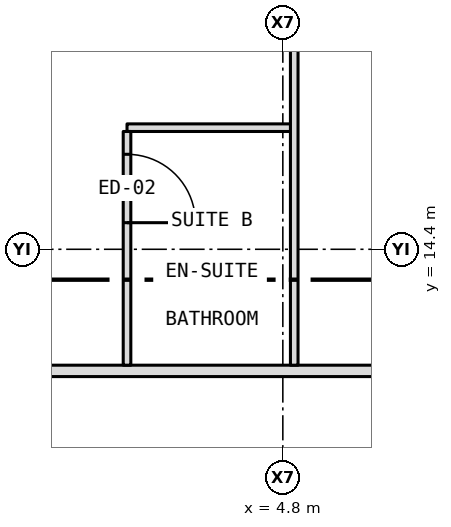
"""IFC4 building model, lengths in metres.
Left out: names, types, materials, properties, quantities, classifications, styles, units other than length and angle.
Written with IfcOpenShell. Run it as: python <this file> out.ifc"""

import sys

from ifc_helpers import new_model, si_unit, direction, frame, frame_2d, origin, place, context, subcontext, project, spatial, rectangle, extrude, element, fill, save


model = new_model("IFC4")
c1 = context("Model", 3, precision=1e-05, world=origin(), true_north=direction((0.0, 1.0)))
c2 = subcontext(c1, "Body", "Model", "MODEL_VIEW")
j1 = project(units=[si_unit("LENGTHUNIT", "METRE"), si_unit("PLANEANGLEUNIT", "RADIAN")], contexts=[c1])
p1 = place(None, origin())
s1 = spatial("IfcSite", under=j1, at=p1, CompositionType="ELEMENT")
p2 = place(p1, origin())
s2 = spatial("IfcBuilding", under=s1, at=p2, CompositionType="ELEMENT")
p3 = place(p2, frame((0.0, 0.0, 191.0)))
s3 = spatial("IfcBuildingStorey", under=s2, at=p3, CompositionType="ELEMENT", Elevation=191.0)
p4 = place(p3, frame((-15.8, 12.8, 0.0), z_axis=(0.0, 0.0, 1.0), x_axis=(1.0, 0.0, 0.0)))
e1 = element("IfcWall", 1, at=p4, inside=s3, PredefinedType="PARTITIONING", context=c2, shape_type="SweptSolid", body=[
    extrude(rectangle(XDim=31.6, YDim=0.15, at=frame_2d((15.8, 0.0))), origin(), (0.0, 0.0, 1.0), 3.35),
])
p5 = place(p4, frame((7.708, 0.0, 0.0)))
e2 = element("IfcOpeningElement", 2, at=p5, cuts=e1, PredefinedType="OPENING", context=c2, shape_type="SweptSolid", body=[
    extrude(rectangle(XDim=1.0, YDim=2.1, at=frame_2d((0.5, 1.05))), frame((0.0, 0.087, 0.0), z_axis=(0.0, -1.0, 0.0), x_axis=(1.0, 0.0, 0.0)), (0.0, 0.0, 1.0), 0.174),
])
p6 = place(p4, frame((12.568, 0.0, 0.0)))
e3 = element("IfcOpeningElement", 3, at=p6, cuts=e1, PredefinedType="OPENING", context=c2, shape_type="SweptSolid", body=[
    extrude(rectangle(XDim=1.0, YDim=2.1, at=frame_2d((0.5, 1.05))), frame((0.0, 0.087, 0.0), z_axis=(0.0, -1.0, 0.0), x_axis=(1.0, 0.0, 0.0)), (0.0, 0.0, 1.0), 0.174),
])
p7 = place(p4, frame((22.892, 0.0, 0.0)))
e4 = element("IfcOpeningElement", 4, at=p7, cuts=e1, PredefinedType="OPENING", context=c2, shape_type="SweptSolid", body=[
    extrude(rectangle(XDim=1.0, YDim=2.1, at=frame_2d((0.5, 1.05))), frame((0.0, 0.087, 0.0), z_axis=(0.0, -1.0, 0.0), x_axis=(1.0, 0.0, 0.0)), (0.0, 0.0, 1.0), 0.174),
])
p8 = place(p4, frame((1.192, 0.0, 0.0)))
e5 = element("IfcOpeningElement", 5, at=p8, cuts=e1, PredefinedType="OPENING", context=c2, shape_type="SweptSolid", body=[
    extrude(rectangle(XDim=1.0, YDim=2.1, at=frame_2d((0.5, 1.05))), frame((0.0, 0.087, 0.0), z_axis=(0.0, -1.0, 0.0), x_axis=(1.0, 0.0, 0.0)), (0.0, 0.0, 1.0), 0.174),
])
p9 = place(p4, frame((29.409, 0.0, 0.0)))
e6 = element("IfcOpeningElement", 6, at=p9, cuts=e1, PredefinedType="OPENING", context=c2, shape_type="SweptSolid", body=[
    extrude(rectangle(XDim=1.0, YDim=2.1, at=frame_2d((0.5, 1.05))), frame((0.0, 0.087, 0.0), z_axis=(0.0, -1.0, 0.0), x_axis=(1.0, 0.0, 0.0)), (0.0, 0.0, 1.0), 0.174),
])
p10 = place(p3, frame((2.75, 16.0, 0.0), z_axis=(0.0, 0.0, 1.0), x_axis=(1.0, 0.0, 0.0)))
e7 = element("IfcWall", 7, at=p10, inside=s3, PredefinedType="PARTITIONING", context=c2, shape_type="SweptSolid", body=[
    extrude(rectangle(XDim=2.2, YDim=0.1, at=frame_2d((1.1, 0.0))), origin(), (0.0, 0.0, 1.0), 3.35),
])
p11 = place(p3, frame((2.75, 12.875, 0.0), z_axis=(0.0, 0.0, 1.0), x_axis=(0.0, 1.0, 0.0)))
e8 = element("IfcWall", 8, at=p11, inside=s3, PredefinedType="PARTITIONING", context=c2, shape_type="SweptSolid", body=[
    extrude(rectangle(XDim=3.075, YDim=0.1, at=frame_2d((1.538, 0.0))), origin(), (0.0, 0.0, 1.0), 3.35),
])
p12 = place(p11, frame((1.875, 0.0, 0.0)))
e9 = element("IfcOpeningElement", 9, at=p12, cuts=e8, PredefinedType="OPENING", context=c2, shape_type="SweptSolid", body=[
    extrude(rectangle(XDim=0.9, YDim=2.1, at=frame_2d((0.45, 1.05))), frame((0.0, 0.062, 0.0), z_axis=(0.0, -1.0, 0.0), x_axis=(1.0, 0.0, 0.0)), (0.0, 0.0, 1.0), 0.124),
])
p13 = place(p3, frame((4.95, 12.875, 0.0), z_axis=(0.0, 0.0, 1.0), x_axis=(0.0, 1.0, 0.0)))
e10 = element("IfcWall", 10, at=p13, inside=s3, PredefinedType="PARTITIONING", context=c2, shape_type="SweptSolid", body=[
    extrude(rectangle(XDim=7.405, YDim=0.1, at=frame_2d((3.703, 0.0))), origin(), (0.0, 0.0, 1.0), 2.817),
])
p14 = place(p12, origin())
e11 = element("IfcDoor", 11, at=p14, inside=s3, OperationType="SINGLE_SWING_LEFT", PredefinedType="DOOR", context=c2, shape_type="SweptSolid", body=[
    extrude(rectangle(XDim=0.9, YDim=2.1, at=frame_2d((0.45, 1.05))), frame((0.0, 0.025, 0.0), z_axis=(0.0, -1.0, 0.0), x_axis=(1.0, 0.0, 0.0)), (0.0, 0.0, 1.0), 0.05),
])
fill(e9, e11)
save(model, sys.argv[1])
